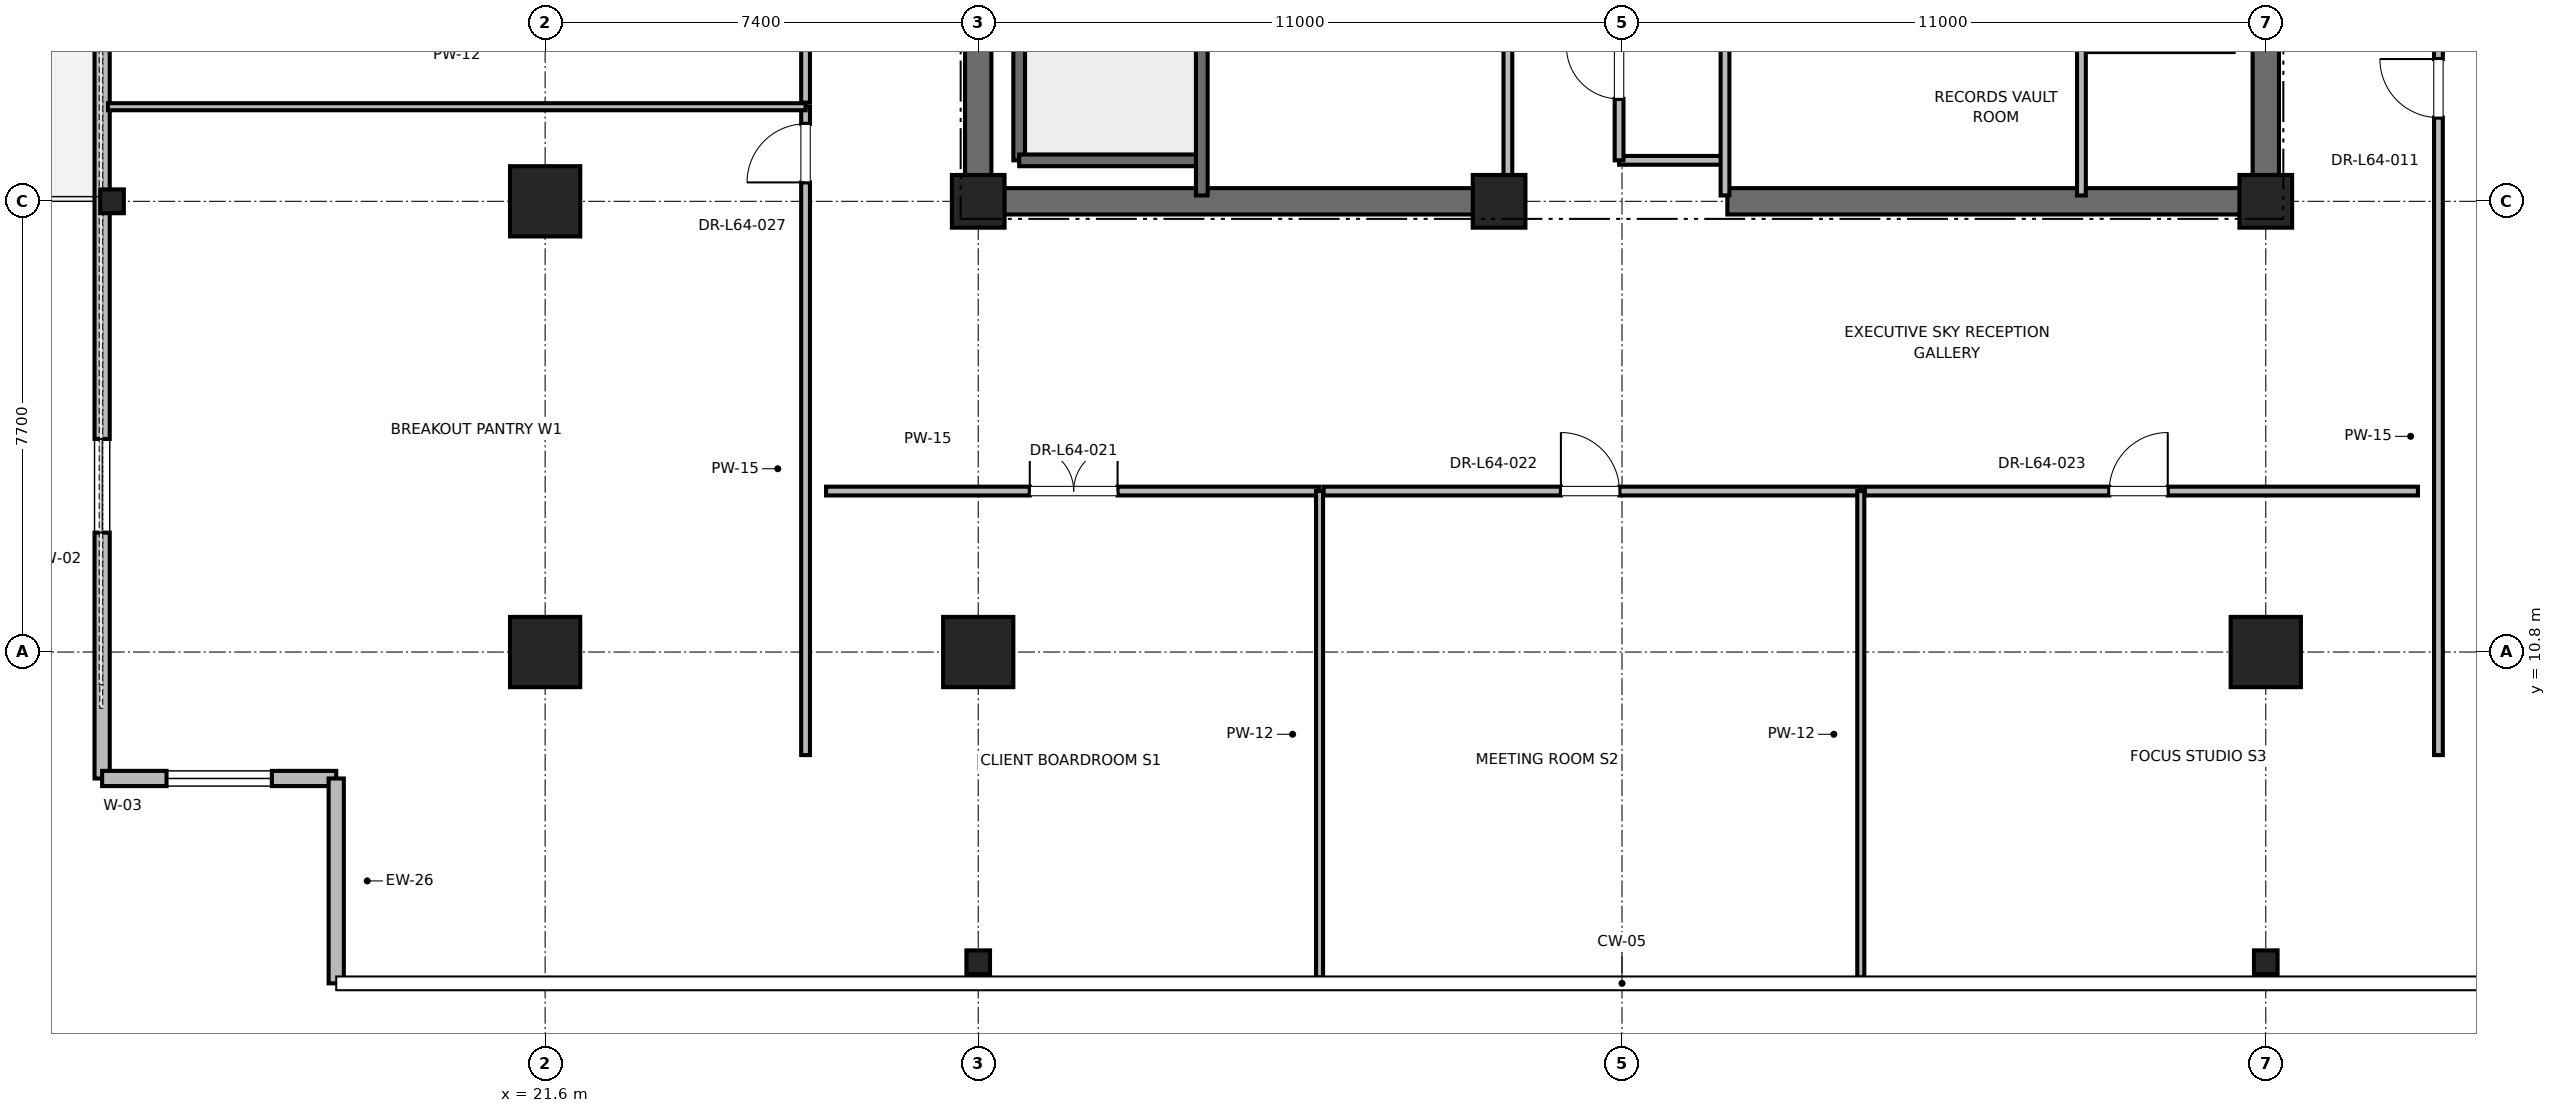
"""IFC4 building model, lengths in metres.
Left out: names, types, materials, properties, quantities, classifications, styles, units other than length and angle.
Written with IfcOpenShell. Run it as: python <this file> out.ifc"""

import sys

from ifc_helpers import new_model, si_unit, direction, frame, frame_2d, origin, origin_2d, place, context, subcontext, project, spatial, rectangle, i_section, extrude, element, fill, save


model = new_model("IFC4")
c1 = context("Model", 3, precision=1e-05, world=origin(), true_north=direction((0.0, 1.0)))
c2 = subcontext(c1, "Body", "Model", "MODEL_VIEW")
j1 = project(units=[si_unit("LENGTHUNIT", "METRE"), si_unit("PLANEANGLEUNIT", "RADIAN")], contexts=[c1])
p1 = place(None, origin())
s1 = spatial("IfcSite", under=j1, at=p1, CompositionType="ELEMENT")
p2 = place(p1, origin())
s2 = spatial("IfcBuilding", under=s1, at=p2, CompositionType="ELEMENT")
p3 = place(p2, frame((0.0, 0.0, 275.2)))
s3 = spatial("IfcBuildingStorey", under=s2, at=p3, CompositionType="ELEMENT", Elevation=275.2)
for number, where, z_axis, x_axis in (
    (1, (29.0, 10.8, 0.0), (0.0, 0.0, 1.0), (1.0, 0.0, 0.0)),
    (2, (51.0, 10.8, 0.0), (0.0, 0.0, 1.0), (1.0, 0.0, 0.0)),
    (3, (21.6, 18.5, 0.0), (0.0, 0.0, 1.0), (1.0, 0.0, 0.0)),
    (4, (21.6, 10.8, 0.0), (0.0, 0.0, 1.0), (1.0, 0.0, 0.0)),
):
    element("IfcColumn", number, at=place(p3, frame(where, z_axis=z_axis, x_axis=x_axis)), inside=s3, PredefinedType="COLUMN", context=c2, shape_type="SweptSolid", body=[
        extrude(rectangle(XDim=1.2, YDim=1.2, at=origin_2d()), origin(), (0.0, 0.0, 1.0), 4.0),
    ])
for number, where, z_axis, x_axis in (
    (5, (14.2, 18.5, 0.0), (0.0, 0.0, 1.0), (1.0, 0.0, 0.0)),
    (6, (29.0, 5.5, 0.0), (0.0, 0.0, 1.0), (1.0, 0.0, 0.0)),
    (7, (51.0, 5.5, 0.0), (0.0, 0.0, 1.0), (1.0, 0.0, 0.0)),
):
    element("IfcColumn", number, at=place(p3, frame(where, z_axis=z_axis, x_axis=x_axis)), inside=s3, PredefinedType="COLUMN", context=c2, shape_type="SweptSolid", body=[
        extrude(i_section(OverallWidth=0.403, OverallDepth=0.406, WebThickness=0.027, FlangeThickness=0.043, FilletRadius=0.015, at=origin_2d()), origin(), (0.0, 0.0, 1.0), 4.0),
    ])
for number, where, z_axis, x_axis in (
    (8, (29.0, 18.5, 0.0), (0.0, 0.0, 1.0), (1.0, 0.0, 0.0)),
    (9, (51.0, 18.5, 0.0), (0.0, 0.0, 1.0), (1.0, 0.0, 0.0)),
    (10, (37.9, 18.5, 0.0), (0.0, 0.0, 1.0), (1.0, 0.0, 0.0)),
):
    element("IfcColumn", number, at=place(p3, frame(where, z_axis=z_axis, x_axis=x_axis)), inside=s3, PredefinedType="PILASTER", context=c2, shape_type="SweptSolid", body=[
        extrude(rectangle(XDim=0.9, YDim=0.9, at=origin_2d()), origin(), (0.0, 0.0, 1.0), 4.0),
    ])
for number, where, z_axis, x_axis in (
    (11, (29.0, 18.5, 0.0), (0.0, 0.0, 1.0), (1.0, 0.0, 0.0)),
    (12, (41.8, 18.5, 0.0), (0.0, 0.0, 1.0), (1.0, 0.0, 0.0)),
):
    element("IfcWall", number, at=place(p3, frame(where, z_axis=z_axis, x_axis=x_axis)), inside=s3, PredefinedType="SHEAR", context=c2, shape_type="SweptSolid", body=[
        extrude(rectangle(XDim=9.2, YDim=0.45, at=frame_2d((4.6, 0.0))), origin(), (0.0, 0.0, 1.0), 3.785),
    ])
p4 = place(p3, frame((29.0, 18.5, 0.0), z_axis=(0.0, 0.0, 1.0), x_axis=(0.0, 1.0, 0.0)))
e13 = element("IfcWall", 13, at=p4, inside=s3, PredefinedType="SHEAR", context=c2, shape_type="SweptSolid", body=[
    extrude(rectangle(XDim=8.8, YDim=0.45, at=frame_2d((4.4, 0.0))), origin(), (0.0, 0.0, 1.0), 3.785),
])
p5 = place(p3, frame((51.0, 18.5, 0.0), z_axis=(0.0, 0.0, 1.0), x_axis=(0.0, 1.0, 0.0)))
e14 = element("IfcWall", 14, at=p5, inside=s3, PredefinedType="SHEAR", context=c2, shape_type="SweptSolid", body=[
    extrude(rectangle(XDim=5.8, YDim=0.45, at=frame_2d((2.9, 0.0))), origin(), (0.0, 0.0, 1.0), 3.785),
])
p6 = place(p3, frame((14.031, 46.36, 0.0), z_axis=(0.0, 0.0, 1.0), x_axis=(0.0, -1.0, 0.0)))
e15 = element("IfcWall", 15, at=p6, inside=s3, PredefinedType="PARAPET", context=c2, shape_type="SweptSolid", body=[
    extrude(rectangle(XDim=37.72, YDim=0.26, at=frame_2d((18.86, 0.0))), origin(), (0.0, 0.0, 1.0), 3.123),
])
p7 = place(p6, frame((4.2, 0.0, 0.85)))
e16 = element("IfcOpeningElement", 16, at=p7, cuts=e15, PredefinedType="OPENING", context=c2, shape_type="SweptSolid", body=[
    extrude(rectangle(XDim=1.6, YDim=2.1, at=frame_2d((0.8, 1.05))), frame((0.0, 0.13, 0.0), z_axis=(0.0, -1.0, 0.0), x_axis=(1.0, 0.0, 0.0)), (0.0, 0.0, 1.0), 0.26),
])
p8 = place(p6, frame((18.26, 0.0, 0.0)))
e17 = element("IfcOpeningElement", 17, at=p8, cuts=e15, PredefinedType="OPENING", context=c2, shape_type="SweptSolid", body=[
    extrude(rectangle(XDim=1.2, YDim=2.2, at=frame_2d((0.6, 1.1))), frame((0.0, 0.13, 0.0), z_axis=(0.0, -1.0, 0.0), x_axis=(1.0, 0.0, 0.0)), (0.0, 0.0, 1.0), 0.26),
])
p9 = place(p6, frame((31.92, 0.0, 0.85)))
e18 = element("IfcOpeningElement", 18, at=p9, cuts=e15, PredefinedType="OPENING", context=c2, shape_type="SweptSolid", body=[
    extrude(rectangle(XDim=1.6, YDim=2.1, at=frame_2d((0.8, 1.05))), frame((0.0, 0.13, 0.0), z_axis=(0.0, -1.0, 0.0), x_axis=(1.0, 0.0, 0.0)), (0.0, 0.0, 1.0), 0.26),
])
p10 = place(p3, frame((14.031, 8.64, 0.0), z_axis=(0.0, 0.0, 1.0), x_axis=(1.0, 0.0, 0.0)))
e19 = element("IfcWall", 19, at=p10, inside=s3, PredefinedType="PARAPET", context=c2, shape_type="SweptSolid", body=[
    extrude(rectangle(XDim=4.0, YDim=0.26, at=frame_2d((2.0, 0.0))), origin(), (0.0, 0.0, 1.0), 3.785),
])
p11 = place(p10, frame((1.1, 0.0, 0.85)))
e20 = element("IfcOpeningElement", 20, at=p11, cuts=e19, PredefinedType="OPENING", context=c2, shape_type="SweptSolid", body=[
    extrude(rectangle(XDim=1.8, YDim=2.2, at=frame_2d((0.9, 1.1))), frame((0.0, 0.13, 0.0), z_axis=(0.0, -1.0, 0.0), x_axis=(1.0, 0.0, 0.0)), (0.0, 0.0, 1.0), 0.26),
])
p12 = place(p3, frame((18.031, 8.64, 0.0), z_axis=(0.0, 0.0, 1.0), x_axis=(0.0, -1.0, 0.0)))
e21 = element("IfcWall", 21, at=p12, inside=s3, PredefinedType="PARAPET", context=c2, shape_type="SweptSolid", body=[
    extrude(rectangle(XDim=3.5, YDim=0.26, at=frame_2d((1.75, 0.0))), origin(), (0.0, 0.0, 1.0), 3.785),
])
p13 = place(p3, frame((29.7, 19.2, 0.0), z_axis=(0.0, 0.0, 1.0), x_axis=(0.0, 1.0, 0.0)))
e22 = element("IfcWall", 22, at=p13, inside=s3, PredefinedType="SOLIDWALL", context=c2, shape_type="SweptSolid", body=[
    extrude(rectangle(XDim=8.15, YDim=0.2, at=frame_2d((4.075, 0.0))), origin(), (0.0, 0.0, 1.0), 3.785),
])
p14 = place(p3, frame((29.7, 19.2, 0.0), z_axis=(0.0, 0.0, 1.0), x_axis=(1.0, 0.0, 0.0)))
e23 = element("IfcWall", 23, at=p14, inside=s3, PredefinedType="SOLIDWALL", context=c2, shape_type="SweptSolid", body=[
    extrude(rectangle(XDim=3.12, YDim=0.2, at=frame_2d((1.56, 0.0))), origin(), (0.0, 0.0, 1.0), 3.785),
])
p15 = place(p3, frame((32.82, 18.6, 0.0), z_axis=(0.0, 0.0, 1.0), x_axis=(0.0, 1.0, 0.0)))
e24 = element("IfcWall", 24, at=p15, inside=s3, PredefinedType="SOLIDWALL", context=c2, shape_type="SweptSolid", body=[
    extrude(rectangle(XDim=8.78, YDim=0.2, at=frame_2d((4.39, 0.0))), origin(), (0.0, 0.0, 1.0), 3.785),
])
p16 = place(p3, frame((39.95, 19.2, 0.0), z_axis=(0.0, 0.0, 1.0), x_axis=(1.0, 0.0, 0.0)))
e25 = element("IfcWall", 25, at=p16, inside=s3, PredefinedType="PARTITIONING", context=c2, shape_type="SweptSolid", body=[
    extrude(rectangle(XDim=1.81, YDim=0.15, at=frame_2d((0.905, 0.0))), origin(), (0.0, 0.0, 1.0), 2.85),
])
p17 = place(p3, frame((41.76, 18.6, 0.0), z_axis=(0.0, 0.0, 1.0), x_axis=(0.0, 1.0, 0.0)))
e26 = element("IfcWall", 26, at=p17, inside=s3, PredefinedType="PARTITIONING", context=c2, shape_type="SweptSolid", body=[
    extrude(rectangle(XDim=3.6, YDim=0.15, at=frame_2d((1.8, 0.0))), origin(), (0.0, 0.0, 1.0), 2.85),
])
p18 = place(p3, frame((39.95, 19.2, 0.0), z_axis=(0.0, 0.0, 1.0), x_axis=(0.0, 1.0, 0.0)))
e27 = element("IfcWall", 27, at=p18, inside=s3, PredefinedType="PARTITIONING", context=c2, shape_type="SweptSolid", body=[
    extrude(rectangle(XDim=3.0, YDim=0.15, at=frame_2d((1.5, 0.0))), origin(), (0.0, 0.0, 1.0), 2.85),
])
p19 = place(p18, frame((1.05, 0.0, 0.0)))
e28 = element("IfcOpeningElement", 28, at=p19, cuts=e27, PredefinedType="OPENING", context=c2, shape_type="SweptSolid", body=[
    extrude(rectangle(XDim=0.9, YDim=2.1, at=frame_2d((0.45, 1.05))), frame((0.0, 0.075, 0.0), z_axis=(0.0, -1.0, 0.0), x_axis=(1.0, 0.0, 0.0)), (0.0, 0.0, 1.0), 0.15),
])
p20 = place(p3, frame((38.05, 18.6, 0.0), z_axis=(0.0, 0.0, 1.0), x_axis=(0.0, 1.0, 0.0)))
e29 = element("IfcWall", 29, at=p20, inside=s3, PredefinedType="PARTITIONING", context=c2, shape_type="SweptSolid", body=[
    extrude(rectangle(XDim=8.78, YDim=0.15, at=frame_2d((4.39, 0.0))), origin(), (0.0, 0.0, 1.0), 2.85),
])
p21 = place(p20, frame((3.89, 0.0, 0.0)))
e30 = element("IfcOpeningElement", 30, at=p21, cuts=e29, PredefinedType="OPENING", context=c2, shape_type="SweptSolid", body=[
    extrude(rectangle(XDim=1.0, YDim=2.15, at=frame_2d((0.5, 1.075))), frame((0.0, 0.075, 0.0), z_axis=(0.0, -1.0, 0.0), x_axis=(1.0, 0.0, 0.0)), (0.0, 0.0, 1.0), 0.15),
])
p22 = place(p3, frame((47.85, 18.6, 0.0), z_axis=(0.0, 0.0, 1.0), x_axis=(0.0, 1.0, 0.0)))
e31 = element("IfcWall", 31, at=p22, inside=s3, PredefinedType="PARTITIONING", context=c2, shape_type="SweptSolid", body=[
    extrude(rectangle(XDim=2.54, YDim=0.15, at=frame_2d((1.27, 0.0))), origin(), (0.0, 0.0, 1.0), 2.85),
])
p23 = place(p3, frame((26.4, 13.55, 0.0), z_axis=(0.0, 0.0, 1.0), x_axis=(1.0, 0.0, 0.0)))
e32 = element("IfcWall", 32, at=p23, inside=s3, PredefinedType="PARTITIONING", context=c2, shape_type="SweptSolid", body=[
    extrude(rectangle(XDim=8.432, YDim=0.15, at=frame_2d((4.216, 0.0))), origin(), (0.0, 0.0, 1.0), 2.85),
])
p24 = place(p23, frame((3.481, 0.0, 0.0)))
e33 = element("IfcOpeningElement", 33, at=p24, cuts=e32, PredefinedType="OPENING", context=c2, shape_type="SweptSolid", body=[
    extrude(rectangle(XDim=1.5, YDim=2.25, at=frame_2d((0.75, 1.125))), frame((0.0, 0.075, 0.0), z_axis=(0.0, -1.0, 0.0), x_axis=(1.0, 0.0, 0.0)), (0.0, 0.0, 1.0), 0.15),
])
p25 = place(p3, frame((34.832, 5.24, 0.0), z_axis=(0.0, 0.0, 1.0), x_axis=(0.0, 1.0, 0.0)))
e34 = element("IfcWall", 34, at=p25, inside=s3, PredefinedType="PARTITIONING", context=c2, shape_type="SweptSolid", body=[
    extrude(rectangle(XDim=8.31, YDim=0.12, at=frame_2d((4.155, 0.0))), origin(), (0.0, 0.0, 1.0), 2.415),
])
p26 = place(p3, frame((34.902, 13.55, 0.0), z_axis=(0.0, 0.0, 1.0), x_axis=(1.0, 0.0, 0.0)))
e35 = element("IfcWall", 35, at=p26, inside=s3, PredefinedType="PARTITIONING", context=c2, shape_type="SweptSolid", body=[
    extrude(rectangle(XDim=9.178, YDim=0.15, at=frame_2d((4.589, 0.0))), origin(), (0.0, 0.0, 1.0), 2.85),
])
p27 = place(p26, frame((4.054, 0.0, 0.0)))
e36 = element("IfcOpeningElement", 36, at=p27, cuts=e35, PredefinedType="OPENING", context=c2, shape_type="SweptSolid", body=[
    extrude(rectangle(XDim=1.0, YDim=2.15, at=frame_2d((0.5, 1.075))), frame((0.0, 0.075, 0.0), z_axis=(0.0, -1.0, 0.0), x_axis=(1.0, 0.0, 0.0)), (0.0, 0.0, 1.0), 0.15),
])
p28 = place(p3, frame((44.08, 5.24, 0.0), z_axis=(0.0, 0.0, 1.0), x_axis=(0.0, 1.0, 0.0)))
e37 = element("IfcWall", 37, at=p28, inside=s3, PredefinedType="PARTITIONING", context=c2, shape_type="SweptSolid", body=[
    extrude(rectangle(XDim=8.31, YDim=0.12, at=frame_2d((4.155, 0.0))), origin(), (0.0, 0.0, 1.0), 2.415),
])
p29 = place(p3, frame((44.15, 13.55, 0.0), z_axis=(0.0, 0.0, 1.0), x_axis=(1.0, 0.0, 0.0)))
e38 = element("IfcWall", 38, at=p29, inside=s3, PredefinedType="PARTITIONING", context=c2, shape_type="SweptSolid", body=[
    extrude(rectangle(XDim=9.45, YDim=0.15, at=frame_2d((4.725, 0.0))), origin(), (0.0, 0.0, 1.0), 2.85),
])
p30 = place(p29, frame((4.175, 0.0, 0.0)))
e39 = element("IfcOpeningElement", 39, at=p30, cuts=e38, PredefinedType="OPENING", context=c2, shape_type="SweptSolid", body=[
    extrude(rectangle(XDim=1.0, YDim=2.15, at=frame_2d((0.5, 1.075))), frame((0.0, 0.075, 0.0), z_axis=(0.0, -1.0, 0.0), x_axis=(1.0, 0.0, 0.0)), (0.0, 0.0, 1.0), 0.15),
])
p31 = place(p3, frame((26.05, 9.04, 0.0), z_axis=(0.0, 0.0, 1.0), x_axis=(0.0, 1.0, 0.0)))
e40 = element("IfcWall", 40, at=p31, inside=s3, PredefinedType="PARTITIONING", context=c2, shape_type="SweptSolid", body=[
    extrude(rectangle(XDim=11.076, YDim=0.15, at=frame_2d((5.538, 0.0))), origin(), (0.0, 0.0, 1.0), 2.85),
])
p32 = place(p31, frame((9.783, 0.0, 0.0)))
e41 = element("IfcOpeningElement", 41, at=p32, cuts=e40, PredefinedType="OPENING", context=c2, shape_type="SweptSolid", body=[
    extrude(rectangle(XDim=1.0, YDim=2.15, at=frame_2d((0.5, 1.075))), frame((0.0, 0.075, 0.0), z_axis=(0.0, -1.0, 0.0), x_axis=(1.0, 0.0, 0.0)), (0.0, 0.0, 1.0), 0.15),
])
p33 = place(p3, frame((14.131, 20.116, 0.0), z_axis=(0.0, 0.0, 1.0), x_axis=(1.0, 0.0, 0.0)))
e42 = element("IfcWall", 42, at=p33, inside=s3, PredefinedType="PARTITIONING", context=c2, shape_type="SweptSolid", body=[
    extrude(rectangle(XDim=11.919, YDim=0.12, at=frame_2d((5.96, 0.0))), origin(), (0.0, 0.0, 1.0), 2.85),
])
p34 = place(p3, frame((26.05, 20.186, 0.0), z_axis=(0.0, 0.0, 1.0), x_axis=(0.0, 1.0, 0.0)))
e43 = element("IfcWall", 43, at=p34, inside=s3, PredefinedType="PARTITIONING", context=c2, shape_type="SweptSolid", body=[
    extrude(rectangle(XDim=13.221, YDim=0.15, at=frame_2d((6.611, 0.0))), origin(), (0.0, 0.0, 1.0), 2.85),
])
p35 = place(p34, frame((6.076, 0.0, 0.0)))
e44 = element("IfcOpeningElement", 44, at=p35, cuts=e43, PredefinedType="OPENING", context=c2, shape_type="SweptSolid", body=[
    extrude(rectangle(XDim=1.0, YDim=2.15, at=frame_2d((0.5, 1.075))), frame((0.0, 0.075, 0.0), z_axis=(0.0, -1.0, 0.0), x_axis=(1.0, 0.0, 0.0)), (0.0, 0.0, 1.0), 0.15),
])
p36 = place(p3, frame((53.95, 9.04, 0.0), z_axis=(0.0, 0.0, 1.0), x_axis=(0.0, 1.0, 0.0)))
e45 = element("IfcWall", 45, at=p36, inside=s3, PredefinedType="PARTITIONING", context=c2, shape_type="SweptSolid", body=[
    extrude(rectangle(XDim=13.292, YDim=0.15, at=frame_2d((6.646, 0.0))), origin(), (0.0, 0.0, 1.0), 2.85),
])
p37 = place(p36, frame((10.891, 0.0, 0.0)))
e46 = element("IfcOpeningElement", 46, at=p37, cuts=e45, PredefinedType="OPENING", context=c2, shape_type="SweptSolid", body=[
    extrude(rectangle(XDim=1.0, YDim=2.15, at=frame_2d((0.5, 1.075))), frame((0.0, 0.075, 0.0), z_axis=(0.0, -1.0, 0.0), x_axis=(1.0, 0.0, 0.0)), (0.0, 0.0, 1.0), 0.15),
])
p38 = place(p9, origin())
e47 = element("IfcWindow", 47, at=p38, inside=s3, PartitioningType="SINGLE_PANEL", PredefinedType="WINDOW", context=c2, shape_type="SweptSolid", body=[
    extrude(rectangle(XDim=1.6, YDim=2.1, at=frame_2d((0.8, 1.05))), frame((0.0, 0.03, 0.0), z_axis=(0.0, -1.0, 0.0), x_axis=(1.0, 0.0, 0.0)), (0.0, 0.0, 1.0), 0.06),
])
fill(e18, e47)
p39 = place(p11, origin())
e48 = element("IfcWindow", 48, at=p39, inside=s3, PartitioningType="SINGLE_PANEL", PredefinedType="WINDOW", context=c2, shape_type="SweptSolid", body=[
    extrude(rectangle(XDim=1.8, YDim=2.2, at=frame_2d((0.9, 1.1))), frame((0.0, 0.03, 0.0), z_axis=(0.0, -1.0, 0.0), x_axis=(1.0, 0.0, 0.0)), (0.0, 0.0, 1.0), 0.06),
])
fill(e20, e48)
p40 = place(p19, origin())
e49 = element("IfcDoor", 49, at=p40, inside=s3, OperationType="SINGLE_SWING_RIGHT", PredefinedType="DOOR", context=c2, shape_type="SweptSolid", body=[
    extrude(rectangle(XDim=0.9, YDim=2.1, at=frame_2d((0.45, 1.05))), frame((0.0, 0.025, 0.0), z_axis=(0.0, -1.0, 0.0), x_axis=(1.0, 0.0, 0.0)), (0.0, 0.0, 1.0), 0.05),
])
fill(e28, e49)
p41 = place(p24, origin())
e50 = element("IfcDoor", 50, at=p41, inside=s3, OperationType="DOUBLE_DOOR_SINGLE_SWING", PredefinedType="DOOR", context=c2, shape_type="SweptSolid", body=[
    extrude(rectangle(XDim=1.5, YDim=2.25, at=frame_2d((0.75, 1.125))), frame((0.0, 0.025, 0.0), z_axis=(0.0, -1.0, 0.0), x_axis=(1.0, 0.0, 0.0)), (0.0, 0.0, 1.0), 0.05),
])
fill(e33, e50)
p42 = place(p27, origin())
e51 = element("IfcDoor", 51, at=p42, inside=s3, OperationType="SINGLE_SWING_LEFT", PredefinedType="DOOR", context=c2, shape_type="SweptSolid", body=[
    extrude(rectangle(XDim=1.0, YDim=2.15, at=frame_2d((0.5, 1.075))), frame((0.0, 0.025, 0.0), z_axis=(0.0, -1.0, 0.0), x_axis=(1.0, 0.0, 0.0)), (0.0, 0.0, 1.0), 0.05),
])
fill(e36, e51)
p43 = place(p30, origin())
e52 = element("IfcDoor", 52, at=p43, inside=s3, OperationType="SINGLE_SWING_RIGHT", PredefinedType="DOOR", context=c2, shape_type="SweptSolid", body=[
    extrude(rectangle(XDim=1.0, YDim=2.15, at=frame_2d((0.5, 1.075))), frame((0.0, 0.025, 0.0), z_axis=(0.0, -1.0, 0.0), x_axis=(1.0, 0.0, 0.0)), (0.0, 0.0, 1.0), 0.05),
])
fill(e39, e52)
p44 = place(p32, origin())
e53 = element("IfcDoor", 53, at=p44, inside=s3, OperationType="SINGLE_SWING_LEFT", PredefinedType="DOOR", context=c2, shape_type="SweptSolid", body=[
    extrude(rectangle(XDim=1.0, YDim=2.15, at=frame_2d((0.5, 1.075))), frame((0.0, 0.025, 0.0), z_axis=(0.0, -1.0, 0.0), x_axis=(1.0, 0.0, 0.0)), (0.0, 0.0, 1.0), 0.05),
])
fill(e41, e53)
p45 = place(p37, origin())
e54 = element("IfcDoor", 54, at=p45, inside=s3, OperationType="SINGLE_SWING_RIGHT", PredefinedType="DOOR", context=c2, shape_type="SweptSolid", body=[
    extrude(rectangle(XDim=1.0, YDim=2.15, at=frame_2d((0.5, 1.075))), frame((0.0, 0.025, 0.0), z_axis=(0.0, -1.0, 0.0), x_axis=(1.0, 0.0, 0.0)), (0.0, 0.0, 1.0), 0.05),
])
fill(e46, e54)
save(model, sys.argv[1])
